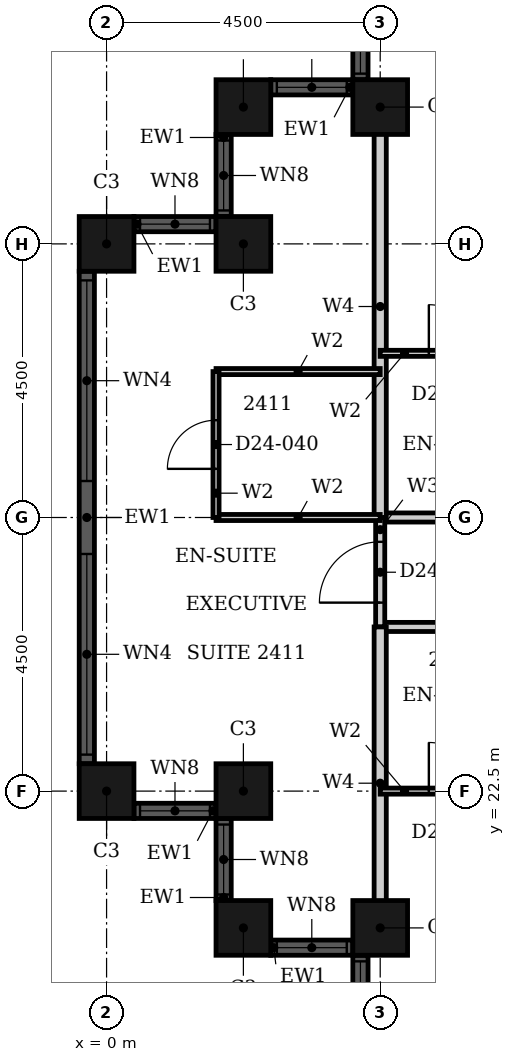
"""IFC4 building model, lengths in metres.
Left out: names, types, materials, properties, quantities, classifications, styles, units other than length and angle.
Written with IfcOpenShell. Run it as: python <this file> out.ifc"""

import sys

from ifc_helpers import new_model, si_unit, direction, frame, frame_2d, origin, origin_2d, place, context, subcontext, project, spatial, rectangle, hollow_rectangle, extrude, element, fill, save


model = new_model("IFC4")
c1 = context("Model", 3, precision=1e-05, world=origin(), true_north=direction((0.0, 1.0)))
c2 = subcontext(c1, "Body", "Model", "MODEL_VIEW")
j1 = project(units=[si_unit("LENGTHUNIT", "METRE"), si_unit("PLANEANGLEUNIT", "RADIAN")], contexts=[c1])
p1 = place(None, origin())
s1 = spatial("IfcSite", under=j1, at=p1, CompositionType="ELEMENT")
p2 = place(p1, origin())
s2 = spatial("IfcBuilding", under=s1, at=p2, CompositionType="ELEMENT")
p3 = place(p2, frame((0.0, 0.0, 100.8)))
s3 = spatial("IfcBuildingStorey", under=s2, at=p3, CompositionType="ELEMENT", Elevation=100.8)
for number, where, z_axis, x_axis in (
    (1, (4.5, 33.75, 0.0), (0.0, 0.0, 1.0), (1.0, 0.0, 0.0)),
    (2, (2.25, 33.75, 0.0), (0.0, 0.0, 1.0), (1.0, 0.0, 0.0)),
    (3, (2.25, 31.5, 0.0), (0.0, 0.0, 1.0), (1.0, 0.0, 0.0)),
    (4, (0.0, 31.5, 0.0), (0.0, 0.0, 1.0), (1.0, 0.0, 0.0)),
    (5, (0.0, 22.5, 0.0), (0.0, 0.0, 1.0), (1.0, 0.0, 0.0)),
    (6, (2.25, 22.5, 0.0), (0.0, 0.0, 1.0), (1.0, 0.0, 0.0)),
    (7, (2.25, 20.25, 0.0), (0.0, 0.0, 1.0), (1.0, 0.0, 0.0)),
    (8, (4.5, 20.25, 0.0), (0.0, 0.0, 1.0), (1.0, 0.0, 0.0)),
):
    element("IfcColumn", number, at=place(p3, frame(where, z_axis=z_axis, x_axis=x_axis)), inside=s3, PredefinedType="COLUMN", context=c2, shape_type="SweptSolid", body=[
        extrude(hollow_rectangle(XDim=0.9, YDim=0.9, WallThickness=0.028, at=origin_2d()), origin(), (0.0, 0.0, 1.0), 3.6),
    ])
p4 = place(p3, frame((4.175, 35.55, 0.0), z_axis=(0.0, 0.0, 1.0), x_axis=(0.0, -1.0, 0.0)))
e9 = element("IfcWall", 9, at=p4, inside=s3, PredefinedType="SOLIDWALL", context=c2, shape_type="SweptSolid", body=[
    extrude(rectangle(XDim=1.35, YDim=0.25, at=frame_2d((0.675, 0.0))), origin(), (0.0, 0.0, 1.0), 3.6),
])
p5 = place(p4, frame((0.1, 0.0, 0.9)))
e10 = element("IfcOpeningElement", 10, at=p5, cuts=e9, PredefinedType="OPENING", context=c2, shape_type="SweptSolid", body=[
    extrude(rectangle(XDim=1.15, YDim=2.08, at=frame_2d((0.575, 1.04))), frame((0.0, 0.135, 0.0), z_axis=(0.0, -1.0, 0.0), x_axis=(1.0, 0.0, 0.0)), (0.0, 0.0, 1.0), 0.27),
])
p6 = place(p3, frame((4.05, 34.075, 0.0), z_axis=(0.0, 0.0, 1.0), x_axis=(-1.0, 0.0, 0.0)))
e11 = element("IfcWall", 11, at=p6, inside=s3, PredefinedType="SOLIDWALL", context=c2, shape_type="SweptSolid", body=[
    extrude(rectangle(XDim=1.35, YDim=0.25, at=frame_2d((0.675, 0.0))), origin(), (0.0, 0.0, 1.0), 3.6),
])
p7 = place(p6, frame((0.1, 0.0, 0.9)))
e12 = element("IfcOpeningElement", 12, at=p7, cuts=e11, PredefinedType="OPENING", context=c2, shape_type="SweptSolid", body=[
    extrude(rectangle(XDim=1.15, YDim=2.08, at=frame_2d((0.575, 1.04))), frame((0.0, 0.135, 0.0), z_axis=(0.0, -1.0, 0.0), x_axis=(1.0, 0.0, 0.0)), (0.0, 0.0, 1.0), 0.27),
])
p8 = place(p3, frame((1.925, 33.3, 0.0), z_axis=(0.0, 0.0, 1.0), x_axis=(0.0, -1.0, 0.0)))
e13 = element("IfcWall", 13, at=p8, inside=s3, PredefinedType="SOLIDWALL", context=c2, shape_type="SweptSolid", body=[
    extrude(rectangle(XDim=1.35, YDim=0.25, at=frame_2d((0.675, 0.0))), origin(), (0.0, 0.0, 1.0), 3.6),
])
p9 = place(p8, frame((0.1, 0.0, 0.9)))
e14 = element("IfcOpeningElement", 14, at=p9, cuts=e13, PredefinedType="OPENING", context=c2, shape_type="SweptSolid", body=[
    extrude(rectangle(XDim=1.15, YDim=2.08, at=frame_2d((0.575, 1.04))), frame((0.0, 0.135, 0.0), z_axis=(0.0, -1.0, 0.0), x_axis=(1.0, 0.0, 0.0)), (0.0, 0.0, 1.0), 0.27),
])
p10 = place(p3, frame((1.8, 31.825, 0.0), z_axis=(0.0, 0.0, 1.0), x_axis=(-1.0, 0.0, 0.0)))
e15 = element("IfcWall", 15, at=p10, inside=s3, PredefinedType="SOLIDWALL", context=c2, shape_type="SweptSolid", body=[
    extrude(rectangle(XDim=1.35, YDim=0.25, at=frame_2d((0.675, 0.0))), origin(), (0.0, 0.0, 1.0), 3.6),
])
p11 = place(p10, frame((0.1, 0.0, 0.9)))
e16 = element("IfcOpeningElement", 16, at=p11, cuts=e15, PredefinedType="OPENING", context=c2, shape_type="SweptSolid", body=[
    extrude(rectangle(XDim=1.15, YDim=2.08, at=frame_2d((0.575, 1.04))), frame((0.0, 0.135, 0.0), z_axis=(0.0, -1.0, 0.0), x_axis=(1.0, 0.0, 0.0)), (0.0, 0.0, 1.0), 0.27),
])
p12 = place(p3, frame((-0.325, 31.05, 0.0), z_axis=(0.0, 0.0, 1.0), x_axis=(0.0, -1.0, 0.0)))
e17 = element("IfcWall", 17, at=p12, inside=s3, PredefinedType="SOLIDWALL", context=c2, shape_type="SweptSolid", body=[
    extrude(rectangle(XDim=8.1, YDim=0.25, at=frame_2d((4.05, 0.0))), origin(), (0.0, 0.0, 1.0), 3.6),
])
p13 = place(p12, frame((0.15, 0.0, 0.9)))
e18 = element("IfcOpeningElement", 18, at=p13, cuts=e17, PredefinedType="OPENING", context=c2, shape_type="SweptSolid", body=[
    extrude(rectangle(XDim=3.3, YDim=2.08, at=frame_2d((1.65, 1.04))), frame((0.0, 0.135, 0.0), z_axis=(0.0, -1.0, 0.0), x_axis=(1.0, 0.0, 0.0)), (0.0, 0.0, 1.0), 0.27),
])
p14 = place(p12, frame((4.65, 0.0, 0.9)))
e19 = element("IfcOpeningElement", 19, at=p14, cuts=e17, PredefinedType="OPENING", context=c2, shape_type="SweptSolid", body=[
    extrude(rectangle(XDim=3.3, YDim=2.08, at=frame_2d((1.65, 1.04))), frame((0.0, 0.135, 0.0), z_axis=(0.0, -1.0, 0.0), x_axis=(1.0, 0.0, 0.0)), (0.0, 0.0, 1.0), 0.27),
])
p15 = place(p3, frame((0.45, 22.175, 0.0), z_axis=(0.0, 0.0, 1.0), x_axis=(1.0, 0.0, 0.0)))
e20 = element("IfcWall", 20, at=p15, inside=s3, PredefinedType="SOLIDWALL", context=c2, shape_type="SweptSolid", body=[
    extrude(rectangle(XDim=1.35, YDim=0.25, at=frame_2d((0.675, 0.0))), origin(), (0.0, 0.0, 1.0), 3.6),
])
p16 = place(p15, frame((0.1, 0.0, 0.9)))
e21 = element("IfcOpeningElement", 21, at=p16, cuts=e20, PredefinedType="OPENING", context=c2, shape_type="SweptSolid", body=[
    extrude(rectangle(XDim=1.15, YDim=2.08, at=frame_2d((0.575, 1.04))), frame((0.0, 0.135, 0.0), z_axis=(0.0, -1.0, 0.0), x_axis=(1.0, 0.0, 0.0)), (0.0, 0.0, 1.0), 0.27),
])
p17 = place(p3, frame((1.925, 22.05, 0.0), z_axis=(0.0, 0.0, 1.0), x_axis=(0.0, -1.0, 0.0)))
e22 = element("IfcWall", 22, at=p17, inside=s3, PredefinedType="SOLIDWALL", context=c2, shape_type="SweptSolid", body=[
    extrude(rectangle(XDim=1.35, YDim=0.25, at=frame_2d((0.675, 0.0))), origin(), (0.0, 0.0, 1.0), 3.6),
])
p18 = place(p17, frame((0.1, 0.0, 0.9)))
e23 = element("IfcOpeningElement", 23, at=p18, cuts=e22, PredefinedType="OPENING", context=c2, shape_type="SweptSolid", body=[
    extrude(rectangle(XDim=1.15, YDim=2.08, at=frame_2d((0.575, 1.04))), frame((0.0, 0.135, 0.0), z_axis=(0.0, -1.0, 0.0), x_axis=(1.0, 0.0, 0.0)), (0.0, 0.0, 1.0), 0.27),
])
p19 = place(p3, frame((2.7, 19.925, 0.0), z_axis=(0.0, 0.0, 1.0), x_axis=(1.0, 0.0, 0.0)))
e24 = element("IfcWall", 24, at=p19, inside=s3, PredefinedType="SOLIDWALL", context=c2, shape_type="SweptSolid", body=[
    extrude(rectangle(XDim=1.35, YDim=0.25, at=frame_2d((0.675, 0.0))), origin(), (0.0, 0.0, 1.0), 3.6),
])
p20 = place(p19, frame((0.1, 0.0, 0.9)))
e25 = element("IfcOpeningElement", 25, at=p20, cuts=e24, PredefinedType="OPENING", context=c2, shape_type="SweptSolid", body=[
    extrude(rectangle(XDim=1.15, YDim=2.08, at=frame_2d((0.575, 1.04))), frame((0.0, 0.135, 0.0), z_axis=(0.0, -1.0, 0.0), x_axis=(1.0, 0.0, 0.0)), (0.0, 0.0, 1.0), 0.27),
])
p21 = place(p3, frame((4.175, 19.8, 0.0), z_axis=(0.0, 0.0, 1.0), x_axis=(0.0, -1.0, 0.0)))
e26 = element("IfcWall", 26, at=p21, inside=s3, PredefinedType="SOLIDWALL", context=c2, shape_type="SweptSolid", body=[
    extrude(rectangle(XDim=1.35, YDim=0.25, at=frame_2d((0.675, 0.0))), origin(), (0.0, 0.0, 1.0), 3.6),
])
p22 = place(p21, frame((0.1, 0.0, 0.9)))
e27 = element("IfcOpeningElement", 27, at=p22, cuts=e26, PredefinedType="OPENING", context=c2, shape_type="SweptSolid", body=[
    extrude(rectangle(XDim=1.15, YDim=2.08, at=frame_2d((0.575, 1.04))), frame((0.0, 0.135, 0.0), z_axis=(0.0, -1.0, 0.0), x_axis=(1.0, 0.0, 0.0)), (0.0, 0.0, 1.0), 0.27),
])
p23 = place(p3, frame((4.5, 25.2, 0.0), z_axis=(0.0, 0.0, 1.0), x_axis=(1.0, 0.0, 0.0)))
e28 = element("IfcWall", 28, at=p23, inside=s3, PredefinedType="PARTITIONING", context=c2, shape_type="SweptSolid", body=[
    extrude(rectangle(XDim=11.7, YDim=0.15, at=frame_2d((5.85, 0.0))), origin(), (0.0, 0.0, 1.0), 3.3),
])
p24 = place(p23, frame((7.45, 0.0, 0.0)))
e29 = element("IfcOpeningElement", 29, at=p24, cuts=e28, PredefinedType="OPENING", context=c2, shape_type="SweptSolid", body=[
    extrude(rectangle(XDim=1.0, YDim=2.1, at=frame_2d((0.5, 1.05))), frame((0.0, 0.085, 0.0), z_axis=(0.0, -1.0, 0.0), x_axis=(1.0, 0.0, 0.0)), (0.0, 0.0, 1.0), 0.17),
])
p25 = place(p23, frame((2.95, 0.0, 0.0)))
e30 = element("IfcOpeningElement", 30, at=p25, cuts=e28, PredefinedType="OPENING", context=c2, shape_type="SweptSolid", body=[
    extrude(rectangle(XDim=1.0, YDim=2.1, at=frame_2d((0.5, 1.05))), frame((0.0, 0.085, 0.0), z_axis=(0.0, -1.0, 0.0), x_axis=(1.0, 0.0, 0.0)), (0.0, 0.0, 1.0), 0.17),
])
p26 = place(p3, frame((4.5, 27.0, 0.0), z_axis=(0.0, 0.0, 1.0), x_axis=(1.0, 0.0, 0.0)))
e31 = element("IfcWall", 31, at=p26, inside=s3, PredefinedType="PARTITIONING", context=c2, shape_type="SweptSolid", body=[
    extrude(rectangle(XDim=11.7, YDim=0.15, at=frame_2d((5.85, 0.0))), origin(), (0.0, 0.0, 1.0), 2.58),
])
p27 = place(p26, frame((6.25, 0.0, 0.0)))
e32 = element("IfcOpeningElement", 32, at=p27, cuts=e31, PredefinedType="OPENING", context=c2, shape_type="SweptSolid", body=[
    extrude(rectangle(XDim=1.0, YDim=2.1, at=frame_2d((0.5, 1.05))), frame((0.0, 0.085, 0.0), z_axis=(0.0, -1.0, 0.0), x_axis=(1.0, 0.0, 0.0)), (0.0, 0.0, 1.0), 0.17),
])
p28 = place(p3, frame((4.5, 25.2, 0.0), z_axis=(0.0, 0.0, 1.0), x_axis=(0.0, 1.0, 0.0)))
e33 = element("IfcWall", 33, at=p28, inside=s3, PredefinedType="PARTITIONING", context=c2, shape_type="SweptSolid", body=[
    extrude(rectangle(XDim=1.8, YDim=0.15, at=frame_2d((0.9, 0.0))), origin(), (0.0, 0.0, 1.0), 3.3),
])
p29 = place(p28, frame((0.4, 0.0, 0.0)))
e34 = element("IfcOpeningElement", 34, at=p29, cuts=e33, PredefinedType="OPENING", context=c2, shape_type="SweptSolid", body=[
    extrude(rectangle(XDim=1.0, YDim=2.1, at=frame_2d((0.5, 1.05))), frame((0.0, 0.085, 0.0), z_axis=(0.0, -1.0, 0.0), x_axis=(1.0, 0.0, 0.0)), (0.0, 0.0, 1.0), 0.17),
])
p30 = place(p3, frame((4.5, 20.06, 0.0), z_axis=(0.0, 0.0, 1.0), x_axis=(0.0, 1.0, 0.0)))
e35 = element("IfcWall", 35, at=p30, inside=s3, PredefinedType="PARTITIONING", context=c2, shape_type="SweptSolid", body=[
    extrude(rectangle(XDim=5.14, YDim=0.2, at=frame_2d((2.57, 0.0))), origin(), (0.0, 0.0, 1.0), 3.3),
])
p31 = place(p3, frame((4.5, 27.0, 0.0), z_axis=(0.0, 0.0, 1.0), x_axis=(0.0, 1.0, 0.0)))
e36 = element("IfcWall", 36, at=p31, inside=s3, PredefinedType="PARTITIONING", context=c2, shape_type="SweptSolid", body=[
    extrude(rectangle(XDim=6.94, YDim=0.2, at=frame_2d((3.47, 0.0))), origin(), (0.0, 0.0, 1.0), 3.3),
])
p32 = place(p3, frame((4.5, 22.5, 0.0), z_axis=(0.0, 0.0, 1.0), x_axis=(1.0, 0.0, 0.0)))
e37 = element("IfcWall", 37, at=p32, inside=s3, PredefinedType="PARTITIONING", context=c2, shape_type="SweptSolid", body=[
    extrude(rectangle(XDim=2.4, YDim=0.1, at=frame_2d((1.2, 0.0))), origin(), (0.0, 0.0, 1.0), 2.58),
])
p33 = place(p32, frame((0.8, 0.0, 0.0)))
e38 = element("IfcOpeningElement", 38, at=p33, cuts=e37, PredefinedType="OPENING", context=c2, shape_type="SweptSolid", body=[
    extrude(rectangle(XDim=0.8, YDim=2.1, at=frame_2d((0.4, 1.05))), frame((0.0, 0.06, 0.0), z_axis=(0.0, -1.0, 0.0), x_axis=(1.0, 0.0, 0.0)), (0.0, 0.0, 1.0), 0.12),
])
p34 = place(p3, frame((1.8, 27.0, 0.0), z_axis=(0.0, 0.0, 1.0), x_axis=(1.0, 0.0, 0.0)))
e39 = element("IfcWall", 39, at=p34, inside=s3, PredefinedType="PARTITIONING", context=c2, shape_type="SweptSolid", body=[
    extrude(rectangle(XDim=2.7, YDim=0.1, at=frame_2d((1.35, 0.0))), origin(), (0.0, 0.0, 1.0), 2.58),
])
p35 = place(p3, frame((1.8, 29.4, 0.0), z_axis=(0.0, 0.0, 1.0), x_axis=(1.0, 0.0, 0.0)))
e40 = element("IfcWall", 40, at=p35, inside=s3, PredefinedType="PARTITIONING", context=c2, shape_type="SweptSolid", body=[
    extrude(rectangle(XDim=2.7, YDim=0.1, at=frame_2d((1.35, 0.0))), origin(), (0.0, 0.0, 1.0), 3.3),
])
p36 = place(p3, frame((4.5, 29.7, 0.0), z_axis=(0.0, 0.0, 1.0), x_axis=(1.0, 0.0, 0.0)))
e41 = element("IfcWall", 41, at=p36, inside=s3, PredefinedType="PARTITIONING", context=c2, shape_type="SweptSolid", body=[
    extrude(rectangle(XDim=2.4, YDim=0.1, at=frame_2d((1.2, 0.0))), origin(), (0.0, 0.0, 1.0), 3.3),
])
p37 = place(p36, frame((0.8, 0.0, 0.0)))
e42 = element("IfcOpeningElement", 42, at=p37, cuts=e41, PredefinedType="OPENING", context=c2, shape_type="SweptSolid", body=[
    extrude(rectangle(XDim=0.8, YDim=2.1, at=frame_2d((0.4, 1.05))), frame((0.0, 0.06, 0.0), z_axis=(0.0, -1.0, 0.0), x_axis=(1.0, 0.0, 0.0)), (0.0, 0.0, 1.0), 0.12),
])
p38 = place(p3, frame((1.8, 27.0, 0.0), z_axis=(0.0, 0.0, 1.0), x_axis=(0.0, 1.0, 0.0)))
e43 = element("IfcWall", 43, at=p38, inside=s3, PredefinedType="PARTITIONING", context=c2, shape_type="SweptSolid", body=[
    extrude(rectangle(XDim=2.4, YDim=0.1, at=frame_2d((1.2, 0.0))), origin(), (0.0, 0.0, 1.0), 3.3),
])
p39 = place(p38, frame((0.8, 0.0, 0.0)))
e44 = element("IfcOpeningElement", 44, at=p39, cuts=e43, PredefinedType="OPENING", context=c2, shape_type="SweptSolid", body=[
    extrude(rectangle(XDim=0.8, YDim=2.1, at=frame_2d((0.4, 1.05))), frame((0.0, 0.06, 0.0), z_axis=(0.0, -1.0, 0.0), x_axis=(1.0, 0.0, 0.0)), (0.0, 0.0, 1.0), 0.12),
])
p40 = place(p5, origin())
e45 = element("IfcWindow", 45, at=p40, inside=s3, PartitioningType="SINGLE_PANEL", PredefinedType="WINDOW", context=c2, shape_type="SweptSolid", body=[
    extrude(rectangle(XDim=1.15, YDim=2.08, at=frame_2d((0.575, 1.04))), frame((0.0, 0.03, 0.0), z_axis=(0.0, -1.0, 0.0), x_axis=(1.0, 0.0, 0.0)), (0.0, 0.0, 1.0), 0.06),
])
fill(e10, e45)
p41 = place(p7, origin())
e46 = element("IfcWindow", 46, at=p41, inside=s3, PartitioningType="SINGLE_PANEL", PredefinedType="WINDOW", context=c2, shape_type="SweptSolid", body=[
    extrude(rectangle(XDim=1.15, YDim=2.08, at=frame_2d((0.575, 1.04))), frame((0.0, 0.03, 0.0), z_axis=(0.0, -1.0, 0.0), x_axis=(1.0, 0.0, 0.0)), (0.0, 0.0, 1.0), 0.06),
])
fill(e12, e46)
p42 = place(p9, origin())
e47 = element("IfcWindow", 47, at=p42, inside=s3, PartitioningType="SINGLE_PANEL", PredefinedType="WINDOW", context=c2, shape_type="SweptSolid", body=[
    extrude(rectangle(XDim=1.15, YDim=2.08, at=frame_2d((0.575, 1.04))), frame((0.0, 0.03, 0.0), z_axis=(0.0, -1.0, 0.0), x_axis=(1.0, 0.0, 0.0)), (0.0, 0.0, 1.0), 0.06),
])
fill(e14, e47)
p43 = place(p11, origin())
e48 = element("IfcWindow", 48, at=p43, inside=s3, PartitioningType="SINGLE_PANEL", PredefinedType="WINDOW", context=c2, shape_type="SweptSolid", body=[
    extrude(rectangle(XDim=1.15, YDim=2.08, at=frame_2d((0.575, 1.04))), frame((0.0, 0.03, 0.0), z_axis=(0.0, -1.0, 0.0), x_axis=(1.0, 0.0, 0.0)), (0.0, 0.0, 1.0), 0.06),
])
fill(e16, e48)
p44 = place(p13, origin())
e49 = element("IfcWindow", 49, at=p44, inside=s3, PartitioningType="SINGLE_PANEL", PredefinedType="WINDOW", context=c2, shape_type="SweptSolid", body=[
    extrude(rectangle(XDim=3.3, YDim=2.08, at=frame_2d((1.65, 1.04))), frame((0.0, 0.03, 0.0), z_axis=(0.0, -1.0, 0.0), x_axis=(1.0, 0.0, 0.0)), (0.0, 0.0, 1.0), 0.06),
])
fill(e18, e49)
p45 = place(p14, origin())
e50 = element("IfcWindow", 50, at=p45, inside=s3, PartitioningType="SINGLE_PANEL", PredefinedType="WINDOW", context=c2, shape_type="SweptSolid", body=[
    extrude(rectangle(XDim=3.3, YDim=2.08, at=frame_2d((1.65, 1.04))), frame((0.0, 0.03, 0.0), z_axis=(0.0, -1.0, 0.0), x_axis=(1.0, 0.0, 0.0)), (0.0, 0.0, 1.0), 0.06),
])
fill(e19, e50)
p46 = place(p16, origin())
e51 = element("IfcWindow", 51, at=p46, inside=s3, PartitioningType="SINGLE_PANEL", PredefinedType="WINDOW", context=c2, shape_type="SweptSolid", body=[
    extrude(rectangle(XDim=1.15, YDim=2.08, at=frame_2d((0.575, 1.04))), frame((0.0, 0.03, 0.0), z_axis=(0.0, -1.0, 0.0), x_axis=(1.0, 0.0, 0.0)), (0.0, 0.0, 1.0), 0.06),
])
fill(e21, e51)
p47 = place(p18, origin())
e52 = element("IfcWindow", 52, at=p47, inside=s3, PartitioningType="SINGLE_PANEL", PredefinedType="WINDOW", context=c2, shape_type="SweptSolid", body=[
    extrude(rectangle(XDim=1.15, YDim=2.08, at=frame_2d((0.575, 1.04))), frame((0.0, 0.03, 0.0), z_axis=(0.0, -1.0, 0.0), x_axis=(1.0, 0.0, 0.0)), (0.0, 0.0, 1.0), 0.06),
])
fill(e23, e52)
p48 = place(p20, origin())
e53 = element("IfcWindow", 53, at=p48, inside=s3, PartitioningType="SINGLE_PANEL", PredefinedType="WINDOW", context=c2, shape_type="SweptSolid", body=[
    extrude(rectangle(XDim=1.15, YDim=2.08, at=frame_2d((0.575, 1.04))), frame((0.0, 0.03, 0.0), z_axis=(0.0, -1.0, 0.0), x_axis=(1.0, 0.0, 0.0)), (0.0, 0.0, 1.0), 0.06),
])
fill(e25, e53)
p49 = place(p22, origin())
e54 = element("IfcWindow", 54, at=p49, inside=s3, PartitioningType="SINGLE_PANEL", PredefinedType="WINDOW", context=c2, shape_type="SweptSolid", body=[
    extrude(rectangle(XDim=1.15, YDim=2.08, at=frame_2d((0.575, 1.04))), frame((0.0, 0.03, 0.0), z_axis=(0.0, -1.0, 0.0), x_axis=(1.0, 0.0, 0.0)), (0.0, 0.0, 1.0), 0.06),
])
fill(e27, e54)
p50 = place(p33, origin())
e55 = element("IfcDoor", 55, at=p50, inside=s3, OperationType="SINGLE_SWING_RIGHT", PredefinedType="DOOR", context=c2, shape_type="SweptSolid", body=[
    extrude(rectangle(XDim=0.8, YDim=2.1, at=frame_2d((0.4, 1.05))), frame((0.0, 0.025, 0.0), z_axis=(0.0, -1.0, 0.0), x_axis=(1.0, 0.0, 0.0)), (0.0, 0.0, 1.0), 0.05),
])
fill(e38, e55)
p51 = place(p37, origin())
e56 = element("IfcDoor", 56, at=p51, inside=s3, OperationType="SINGLE_SWING_LEFT", PredefinedType="DOOR", context=c2, shape_type="SweptSolid", body=[
    extrude(rectangle(XDim=0.8, YDim=2.1, at=frame_2d((0.4, 1.05))), frame((0.0, 0.025, 0.0), z_axis=(0.0, -1.0, 0.0), x_axis=(1.0, 0.0, 0.0)), (0.0, 0.0, 1.0), 0.05),
])
fill(e42, e56)
p52 = place(p29, origin())
e57 = element("IfcDoor", 57, at=p52, inside=s3, OperationType="SINGLE_SWING_LEFT", PredefinedType="DOOR", context=c2, shape_type="SweptSolid", body=[
    extrude(rectangle(XDim=1.0, YDim=2.1, at=frame_2d((0.5, 1.05))), frame((0.0, 0.025, 0.0), z_axis=(0.0, -1.0, 0.0), x_axis=(1.0, 0.0, 0.0)), (0.0, 0.0, 1.0), 0.05),
])
fill(e34, e57)
p53 = place(p39, origin())
e58 = element("IfcDoor", 58, at=p53, inside=s3, OperationType="SINGLE_SWING_RIGHT", PredefinedType="DOOR", context=c2, shape_type="SweptSolid", body=[
    extrude(rectangle(XDim=0.8, YDim=2.1, at=frame_2d((0.4, 1.05))), frame((0.0, 0.025, 0.0), z_axis=(0.0, -1.0, 0.0), x_axis=(1.0, 0.0, 0.0)), (0.0, 0.0, 1.0), 0.05),
])
fill(e44, e58)
save(model, sys.argv[1])
